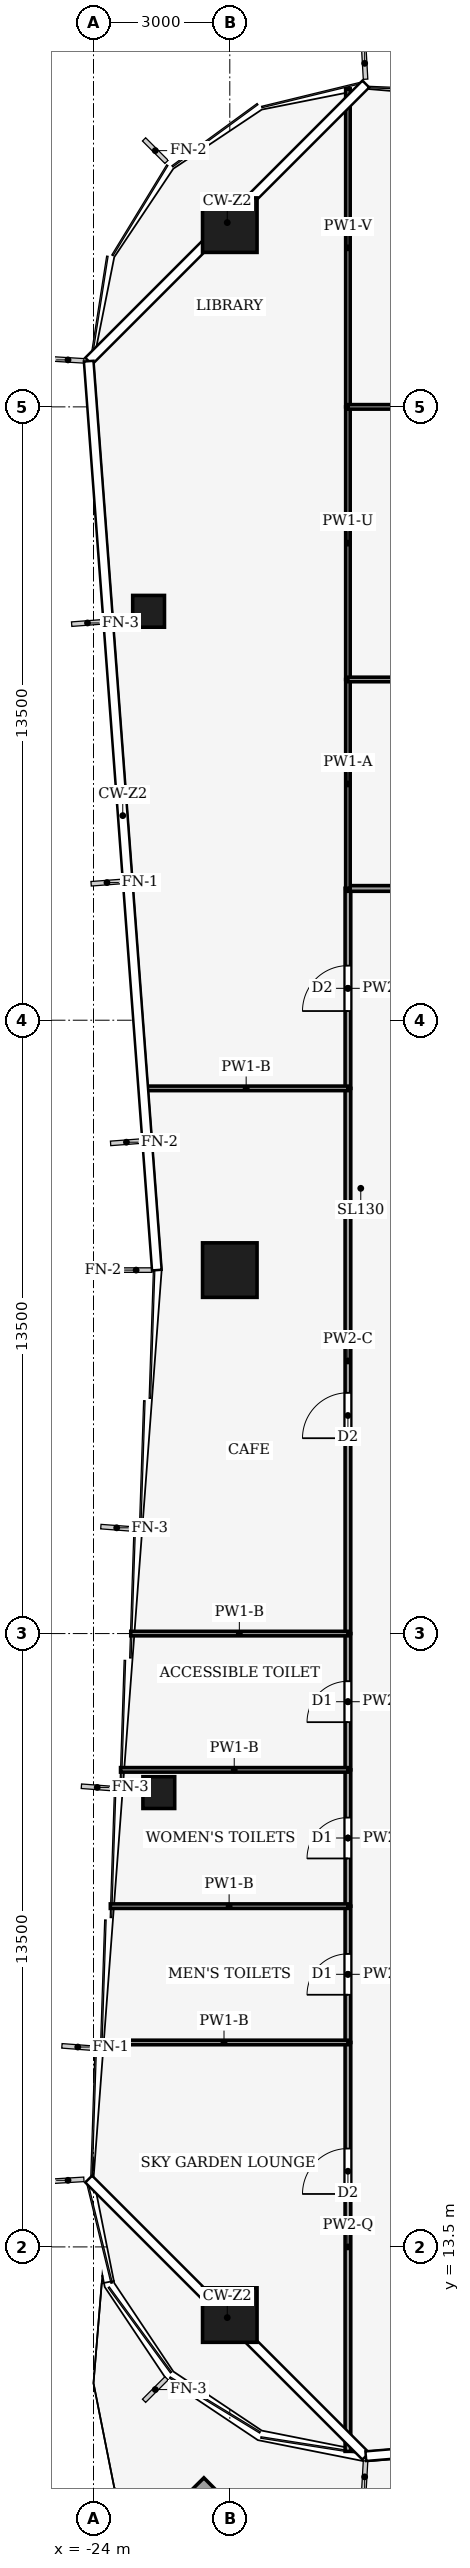
"""IFC4 building model, lengths in metres.
Left out: names, types, materials, properties, quantities, classifications, styles, units other than length and angle.
Written with IfcOpenShell. Run it as: python <this file> out.ifc"""

import sys

from ifc_helpers import new_model, si_unit, direction, frame, frame_2d, origin, origin_2d, place, context, subcontext, project, spatial, rectangle, hollow_rectangle, extrude, element, fill, save


model = new_model("IFC4")
c1 = context("Model", 3, precision=1e-05, world=origin(), true_north=direction((0.0, 1.0)))
c2 = subcontext(c1, "Body", "Model", "MODEL_VIEW")
j1 = project(units=[si_unit("LENGTHUNIT", "METRE"), si_unit("PLANEANGLEUNIT", "RADIAN")], contexts=[c1])
p1 = place(None, origin())
s1 = spatial("IfcSite", under=j1, at=p1, CompositionType="ELEMENT")
p2 = place(p1, origin())
s2 = spatial("IfcBuilding", under=s1, at=p2, CompositionType="ELEMENT")
p3 = place(p2, frame((0.0, 0.0, 121.0)))
s3 = spatial("IfcBuildingStorey", under=s2, at=p3, CompositionType="ELEMENT", Elevation=121.0)
for number, where, z_axis, x_axis in (
    (1, (-21.0, 58.0, 0.0), (0.0, 0.0, 1.0), (1.0, 0.0, 0.0)),
    (2, (-21.0, 12.0, 0.0), (0.0, 0.0, 1.0), (1.0, 0.0, 0.0)),
    (3, (-21.0, 35.0, 0.0), (0.0, 0.0, 1.0), (1.0, 0.0, 0.0)),
):
    element("IfcColumn", number, at=place(p3, frame(where, z_axis=z_axis, x_axis=x_axis)), inside=s3, PredefinedType="COLUMN", context=c2, shape_type="SweptSolid", body=[
        extrude(hollow_rectangle(XDim=1.2, YDim=1.2, WallThickness=0.07, at=origin_2d()), origin(), (0.0, 0.0, 1.0), 5.0),
    ])
for number, where, z_axis, x_axis in (
    (4, (-22.562, 23.5, 0.0), (0.0, 0.0, 1.0), (1.0, 0.0, 0.0)),
    (5, (-22.788, 49.5, 0.0), (0.0, 0.0, 1.0), (1.0, 0.0, 0.0)),
):
    element("IfcColumn", number, at=place(p3, frame(where, z_axis=z_axis, x_axis=x_axis)), inside=s3, PredefinedType="COLUMN", context=c2, shape_type="SweptSolid", body=[
        extrude(hollow_rectangle(XDim=0.7, YDim=0.7, WallThickness=0.03, at=origin_2d()), origin(), (0.0, 0.0, 1.0), 5.0),
    ])
p4 = place(p3, frame((-20.058, 6.255, 0.0), z_axis=(0.0, 0.0, 1.0), x_axis=(-0.704331354941, 0.709871356266, 0.0)))
e6 = element("IfcWall", 6, at=p4, inside=s3, PredefinedType="USERDEFINED", context=c2, shape_type="SweptSolid", body=[
    extrude(rectangle(XDim=2.6, YDim=0.9, at=frame_2d((1.3, 0.0))), origin(), (0.0, 0.0, 1.0), 0.5),
])
p5 = place(p3, frame((-18.4, 9.0, 0.0), z_axis=(0.0, 0.0, 1.0), x_axis=(0.0, 1.0, 0.0)))
e7 = element("IfcWall", 7, at=p5, inside=s3, PredefinedType="PARTITIONING", context=c2, shape_type="SweptSolid", body=[
    extrude(rectangle(XDim=9.0, YDim=0.125, at=frame_2d((4.5, 0.0))), origin(), (0.0, 0.0, 1.0), 3.93),
])
p6 = place(p5, frame((5.666, 0.0, 0.0)))
e8 = element("IfcOpeningElement", 8, at=p6, cuts=e7, PredefinedType="OPENING", context=c2, shape_type="SweptSolid", body=[
    extrude(rectangle(XDim=1.0, YDim=2.1, at=frame_2d((0.5, 1.05))), frame((0.0, 0.073, 0.0), z_axis=(0.0, -1.0, 0.0), x_axis=(1.0, 0.0, 0.0)), (0.0, 0.0, 1.0), 0.145),
])
p7 = place(p3, frame((-18.4, 18.0, 0.0), z_axis=(0.0, 0.0, 1.0), x_axis=(0.0, 1.0, 0.0)))
e9 = element("IfcWall", 9, at=p7, inside=s3, PredefinedType="PARTITIONING", context=c2, shape_type="SweptSolid", body=[
    extrude(rectangle(XDim=3.0, YDim=0.125, at=frame_2d((1.5, 0.0))), origin(), (0.0, 0.0, 1.0), 4.48),
])
p8 = place(p7, frame((1.05, 0.0, 0.0)))
e10 = element("IfcOpeningElement", 10, at=p8, cuts=e9, PredefinedType="OPENING", context=c2, shape_type="SweptSolid", body=[
    extrude(rectangle(XDim=0.9, YDim=2.1, at=frame_2d((0.45, 1.05))), frame((0.0, 0.073, 0.0), z_axis=(0.0, -1.0, 0.0), x_axis=(1.0, 0.0, 0.0)), (0.0, 0.0, 1.0), 0.145),
])
p9 = place(p3, frame((-18.4, 21.0, 0.0), z_axis=(0.0, 0.0, 1.0), x_axis=(0.0, 1.0, 0.0)))
e11 = element("IfcWall", 11, at=p9, inside=s3, PredefinedType="PARTITIONING", context=c2, shape_type="SweptSolid", body=[
    extrude(rectangle(XDim=3.0, YDim=0.125, at=frame_2d((1.5, 0.0))), origin(), (0.0, 0.0, 1.0), 4.48),
])
p10 = place(p9, frame((1.05, 0.0, 0.0)))
e12 = element("IfcOpeningElement", 12, at=p10, cuts=e11, PredefinedType="OPENING", context=c2, shape_type="SweptSolid", body=[
    extrude(rectangle(XDim=0.9, YDim=2.1, at=frame_2d((0.45, 1.05))), frame((0.0, 0.073, 0.0), z_axis=(0.0, -1.0, 0.0), x_axis=(1.0, 0.0, 0.0)), (0.0, 0.0, 1.0), 0.145),
])
p11 = place(p3, frame((-18.4, 24.0, 0.0), z_axis=(0.0, 0.0, 1.0), x_axis=(0.0, 1.0, 0.0)))
e13 = element("IfcWall", 13, at=p11, inside=s3, PredefinedType="PARTITIONING", context=c2, shape_type="SweptSolid", body=[
    extrude(rectangle(XDim=3.0, YDim=0.125, at=frame_2d((1.5, 0.0))), origin(), (0.0, 0.0, 1.0), 4.87),
])
p12 = place(p11, frame((1.05, 0.0, 0.0)))
e14 = element("IfcOpeningElement", 14, at=p12, cuts=e13, PredefinedType="OPENING", context=c2, shape_type="SweptSolid", body=[
    extrude(rectangle(XDim=0.9, YDim=2.1, at=frame_2d((0.45, 1.05))), frame((0.0, 0.073, 0.0), z_axis=(0.0, -1.0, 0.0), x_axis=(1.0, 0.0, 0.0)), (0.0, 0.0, 1.0), 0.145),
])
p13 = place(p3, frame((-18.4, 27.0, 0.0), z_axis=(0.0, 0.0, 1.0), x_axis=(0.0, 1.0, 0.0)))
e15 = element("IfcWall", 15, at=p13, inside=s3, PredefinedType="PARTITIONING", context=c2, shape_type="SweptSolid", body=[
    extrude(rectangle(XDim=12.0, YDim=0.125, at=frame_2d((6.0, 0.0))), origin(), (0.0, 0.0, 1.0), 4.14),
])
p14 = place(p13, frame((4.3, 0.0, 0.0)))
e16 = element("IfcOpeningElement", 16, at=p14, cuts=e15, PredefinedType="OPENING", context=c2, shape_type="SweptSolid", body=[
    extrude(rectangle(XDim=1.0, YDim=2.1, at=frame_2d((0.5, 1.05))), frame((0.0, 0.073, 0.0), z_axis=(0.0, -1.0, 0.0), x_axis=(1.0, 0.0, 0.0)), (0.0, 0.0, 1.0), 0.145),
])
p15 = place(p3, frame((-18.4, 39.0, 0.0), z_axis=(0.0, 0.0, 1.0), x_axis=(0.0, 1.0, 0.0)))
e17 = element("IfcWall", 17, at=p15, inside=s3, PredefinedType="PARTITIONING", context=c2, shape_type="SweptSolid", body=[
    extrude(rectangle(XDim=4.404, YDim=0.125, at=frame_2d((2.202, 0.0))), origin(), (0.0, 0.0, 1.0), 4.87),
])
p16 = place(p15, frame((1.702, 0.0, 0.0)))
e18 = element("IfcOpeningElement", 18, at=p16, cuts=e17, PredefinedType="OPENING", context=c2, shape_type="SweptSolid", body=[
    extrude(rectangle(XDim=1.0, YDim=2.1, at=frame_2d((0.5, 1.05))), frame((0.0, 0.073, 0.0), z_axis=(0.0, -1.0, 0.0), x_axis=(1.0, 0.0, 0.0)), (0.0, 0.0, 1.0), 0.145),
])
p17 = place(p3, frame((-18.4, 43.4, 0.0), z_axis=(0.0, 0.0, 1.0), x_axis=(1.0, 0.0, 0.0)))
e19 = element("IfcWall", 19, at=p17, inside=s3, PredefinedType="PARTITIONING", context=c2, shape_type="SweptSolid", body=[
    extrude(rectangle(XDim=12.4, YDim=0.125, at=frame_2d((6.2, 0.0))), origin(), (0.0, 0.0, 1.0), 4.44),
])
p18 = place(p17, frame((5.7, 0.0, 0.0)))
e20 = element("IfcOpeningElement", 20, at=p18, cuts=e19, PredefinedType="OPENING", context=c2, shape_type="SweptSolid", body=[
    extrude(rectangle(XDim=1.0, YDim=2.1, at=frame_2d((0.5, 1.05))), frame((0.0, 0.073, 0.0), z_axis=(0.0, -1.0, 0.0), x_axis=(1.0, 0.0, 0.0)), (0.0, 0.0, 1.0), 0.145),
])
p19 = place(p3, frame((-18.4, 18.0, 0.0), z_axis=(0.0, 0.0, 1.0), x_axis=(-1.0, 0.0, 0.0)))
e21 = element("IfcWall", 21, at=p19, inside=s3, PredefinedType="PARTITIONING", context=c2, shape_type="SweptSolid", body=[
    extrude(rectangle(XDim=5.455, YDim=0.1, at=frame_2d((2.728, 0.0))), origin(), (0.0, 0.0, 1.0), 4.04),
])
p20 = place(p3, frame((-18.4, 21.0, 0.0), z_axis=(0.0, 0.0, 1.0), x_axis=(-1.0, 0.0, 0.0)))
e22 = element("IfcWall", 22, at=p20, inside=s3, PredefinedType="PARTITIONING", context=c2, shape_type="SweptSolid", body=[
    extrude(rectangle(XDim=5.23, YDim=0.1, at=frame_2d((2.615, 0.0))), origin(), (0.0, 0.0, 1.0), 4.04),
])
p21 = place(p3, frame((-18.4, 24.0, 0.0), z_axis=(0.0, 0.0, 1.0), x_axis=(-1.0, 0.0, 0.0)))
e23 = element("IfcWall", 23, at=p21, inside=s3, PredefinedType="PARTITIONING", context=c2, shape_type="SweptSolid", body=[
    extrude(rectangle(XDim=5.005, YDim=0.1, at=frame_2d((2.502, 0.0))), origin(), (0.0, 0.0, 1.0), 4.04),
])
p22 = place(p3, frame((-18.4, 27.0, 0.0), z_axis=(0.0, 0.0, 1.0), x_axis=(-1.0, 0.0, 0.0)))
e24 = element("IfcWall", 24, at=p22, inside=s3, PredefinedType="PARTITIONING", context=c2, shape_type="SweptSolid", body=[
    extrude(rectangle(XDim=4.78, YDim=0.1, at=frame_2d((2.39, 0.0))), origin(), (0.0, 0.0, 1.0), 4.04),
])
p23 = place(p3, frame((-18.4, 39.0, 0.0), z_axis=(0.0, 0.0, 1.0), x_axis=(-1.0, 0.0, 0.0)))
e25 = element("IfcWall", 25, at=p23, inside=s3, PredefinedType="PARTITIONING", context=c2, shape_type="SweptSolid", body=[
    extrude(rectangle(XDim=4.48, YDim=0.1, at=frame_2d((2.24, 0.0))), origin(), (0.0, 0.0, 1.0), 4.04),
])
p24 = place(p3, frame((-18.4, 43.4, 0.0), z_axis=(0.0, 0.0, 1.0), x_axis=(0.0, 1.0, 0.0)))
e26 = element("IfcWall", 26, at=p24, inside=s3, PredefinedType="PARTITIONING", context=c2, shape_type="SweptSolid", body=[
    extrude(rectangle(XDim=4.6, YDim=0.1, at=frame_2d((2.3, 0.0))), origin(), (0.0, 0.0, 1.0), 4.87),
])
p25 = place(p3, frame((-18.4, 48.0, 0.0), z_axis=(0.0, 0.0, 1.0), x_axis=(0.0, 1.0, 0.0)))
e27 = element("IfcWall", 27, at=p25, inside=s3, PredefinedType="PARTITIONING", context=c2, shape_type="SweptSolid", body=[
    extrude(rectangle(XDim=6.0, YDim=0.1, at=frame_2d((3.0, 0.0))), origin(), (0.0, 0.0, 1.0), 4.24),
])
p26 = place(p3, frame((-18.4, 54.0, 0.0), z_axis=(0.0, 0.0, 1.0), x_axis=(0.0, 1.0, 0.0)))
e28 = element("IfcWall", 28, at=p26, inside=s3, PredefinedType="PARTITIONING", context=c2, shape_type="SweptSolid", body=[
    extrude(rectangle(XDim=7.0, YDim=0.1, at=frame_2d((3.5, 0.0))), origin(), (0.0, 0.0, 1.0), 3.93),
])
p27 = place(p3, frame((-5.996, 48.0, 0.0), z_axis=(0.0, 0.0, 1.0), x_axis=(-1.0, 0.0, 0.0)))
e29 = element("IfcWall", 29, at=p27, inside=s3, PredefinedType="PARTITIONING", context=c2, shape_type="SweptSolid", body=[
    extrude(rectangle(XDim=12.404, YDim=0.1, at=frame_2d((6.202, 0.0))), origin(), (0.0, 0.0, 1.0), 4.44),
])
p28 = place(p3, frame((-18.4, 54.0, 0.0), z_axis=(0.0, 0.0, 1.0), x_axis=(1.0, 0.0, 0.0)))
e30 = element("IfcWall", 30, at=p28, inside=s3, PredefinedType="PARTITIONING", context=c2, shape_type="SweptSolid", body=[
    extrude(rectangle(XDim=9.4, YDim=0.1, at=frame_2d((4.7, 0.0))), origin(), (0.0, 0.0, 1.0), 4.44),
])
p29 = place(p28, frame((4.2, 0.0, 0.0)))
e31 = element("IfcOpeningElement", 31, at=p29, cuts=e30, PredefinedType="OPENING", context=c2, shape_type="SweptSolid", body=[
    extrude(rectangle(XDim=1.0, YDim=2.1, at=frame_2d((0.5, 1.05))), frame((0.0, 0.06, 0.0), z_axis=(0.0, -1.0, 0.0), x_axis=(1.0, 0.0, 0.0)), (0.0, 0.0, 1.0), 0.12),
])
p30 = place(p6, origin())
e32 = element("IfcDoor", 32, at=p30, inside=s3, OperationType="SINGLE_SWING_RIGHT", PredefinedType="DOOR", context=c2, shape_type="SweptSolid", body=[
    extrude(rectangle(XDim=1.0, YDim=2.1, at=frame_2d((0.5, 1.05))), frame((0.0, 0.025, 0.0), z_axis=(0.0, -1.0, 0.0), x_axis=(1.0, 0.0, 0.0)), (0.0, 0.0, 1.0), 0.05),
])
fill(e8, e32)
p31 = place(p8, origin())
e33 = element("IfcDoor", 33, at=p31, inside=s3, OperationType="SINGLE_SWING_RIGHT", PredefinedType="DOOR", context=c2, shape_type="SweptSolid", body=[
    extrude(rectangle(XDim=0.9, YDim=2.1, at=frame_2d((0.45, 1.05))), frame((0.0, 0.025, 0.0), z_axis=(0.0, -1.0, 0.0), x_axis=(1.0, 0.0, 0.0)), (0.0, 0.0, 1.0), 0.05),
])
fill(e10, e33)
p32 = place(p10, origin())
e34 = element("IfcDoor", 34, at=p32, inside=s3, OperationType="SINGLE_SWING_LEFT", PredefinedType="DOOR", context=c2, shape_type="SweptSolid", body=[
    extrude(rectangle(XDim=0.9, YDim=2.1, at=frame_2d((0.45, 1.05))), frame((0.0, 0.025, 0.0), z_axis=(0.0, -1.0, 0.0), x_axis=(1.0, 0.0, 0.0)), (0.0, 0.0, 1.0), 0.05),
])
fill(e12, e34)
p33 = place(p12, origin())
e35 = element("IfcDoor", 35, at=p33, inside=s3, OperationType="SINGLE_SWING_RIGHT", PredefinedType="DOOR", context=c2, shape_type="SweptSolid", body=[
    extrude(rectangle(XDim=0.9, YDim=2.1, at=frame_2d((0.45, 1.05))), frame((0.0, 0.025, 0.0), z_axis=(0.0, -1.0, 0.0), x_axis=(1.0, 0.0, 0.0)), (0.0, 0.0, 1.0), 0.05),
])
fill(e14, e35)
p34 = place(p14, origin())
e36 = element("IfcDoor", 36, at=p34, inside=s3, OperationType="SINGLE_SWING_LEFT", PredefinedType="DOOR", context=c2, shape_type="SweptSolid", body=[
    extrude(rectangle(XDim=1.0, YDim=2.1, at=frame_2d((0.5, 1.05))), frame((0.0, 0.025, 0.0), z_axis=(0.0, -1.0, 0.0), x_axis=(1.0, 0.0, 0.0)), (0.0, 0.0, 1.0), 0.05),
])
fill(e16, e36)
p35 = place(p16, origin())
e37 = element("IfcDoor", 37, at=p35, inside=s3, OperationType="SINGLE_SWING_RIGHT", PredefinedType="DOOR", context=c2, shape_type="SweptSolid", body=[
    extrude(rectangle(XDim=1.0, YDim=2.1, at=frame_2d((0.5, 1.05))), frame((0.0, 0.025, 0.0), z_axis=(0.0, -1.0, 0.0), x_axis=(1.0, 0.0, 0.0)), (0.0, 0.0, 1.0), 0.05),
])
fill(e18, e37)
save(model, sys.argv[1])
